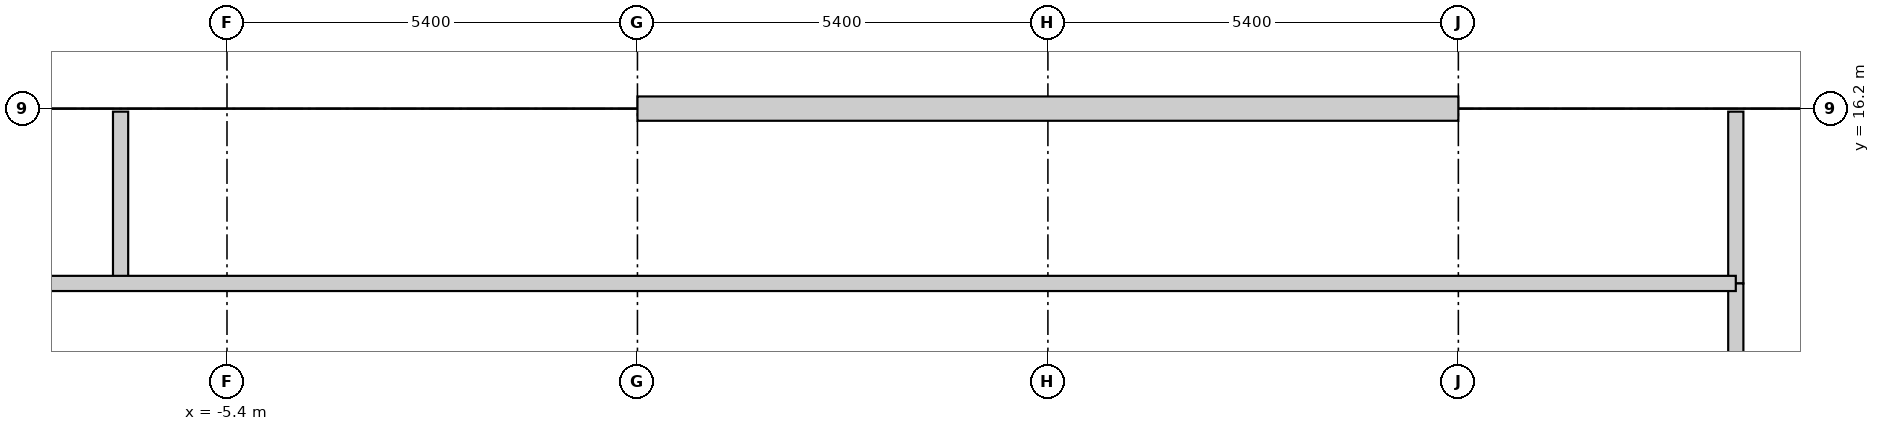
"""IFC4 building model, lengths in metres.
Left out: names, types, materials, properties, quantities, classifications, styles, units other than length and angle.
Written with IfcOpenShell. Run it as: python <this file> out.ifc"""

import sys

from ifc_helpers import new_model, si_unit, direction, frame, frame_2d, origin, place, context, subcontext, project, spatial, rectangle, extrude, element, fill, save


model = new_model("IFC4")
c1 = context("Model", 3, precision=1e-05, world=origin(), true_north=direction((0.0, 1.0)))
c2 = subcontext(c1, "Body", "Model", "MODEL_VIEW")
j1 = project(units=[si_unit("LENGTHUNIT", "METRE"), si_unit("PLANEANGLEUNIT", "RADIAN")], contexts=[c1])
p1 = place(None, origin())
s1 = spatial("IfcSite", under=j1, at=p1, CompositionType="ELEMENT")
p2 = place(p1, origin())
s2 = spatial("IfcBuilding", under=s1, at=p2, CompositionType="ELEMENT")
p3 = place(p2, origin())
s3 = spatial("IfcBuildingStorey", under=s2, at=p3, CompositionType="ELEMENT", Elevation=0.0)
p4 = place(p3, frame((0.0, 16.2, 0.0), z_axis=(0.0, 0.0, 1.0), x_axis=(1.0, 0.0, 0.0)))
e1 = element("IfcWall", 1, at=p4, inside=s3, PredefinedType="STANDARD", context=c2, shape_type="SweptSolid", body=[
    extrude(rectangle(XDim=10.8, YDim=0.32, at=frame_2d((5.4, 0.0))), origin(), (0.0, 0.0, 1.0), 3.329),
])
p5 = place(p4, frame((4.5, 0.0, 0.0)))
e2 = element("IfcOpeningElement", 2, at=p5, cuts=e1, PredefinedType="OPENING", context=c2, shape_type="SweptSolid", body=[
    extrude(rectangle(XDim=1.8, YDim=2.35, at=frame_2d((0.9, 1.175))), frame((0.0, 0.17, 0.0), z_axis=(0.0, -1.0, 0.0), x_axis=(1.0, 0.0, 0.0)), (0.0, 0.0, 1.0), 0.34),
])
for number, where, z_axis, x_axis in (
    (3, (-6.8, 13.9, 0.0), (0.0, 0.0, 1.0), (0.0, 1.0, 0.0)),
    (4, (14.45, 13.9, 0.0), (0.0, 0.0, 1.0), (0.0, 1.0, 0.0)),
):
    element("IfcWall", number, at=place(p3, frame(where, z_axis=z_axis, x_axis=x_axis)), inside=s3, PredefinedType="PARTITIONING", context=c2, shape_type="SweptSolid", body=[
        extrude(rectangle(XDim=2.26, YDim=0.2, at=frame_2d((1.13, 0.0))), origin(), (0.0, 0.0, 1.0), 4.2),
    ])
p6 = place(p3, frame((14.45, 0.0, 0.0), z_axis=(0.0, 0.0, 1.0), x_axis=(0.0, 1.0, 0.0)))
e5 = element("IfcWall", 5, at=p6, inside=s3, PredefinedType="PARTITIONING", context=c2, shape_type="SweptSolid", body=[
    extrude(rectangle(XDim=13.9, YDim=0.2, at=frame_2d((6.95, 0.0))), origin(), (0.0, 0.0, 1.0), 3.329),
])
p7 = place(p6, frame((2.5, 0.0, 0.0)))
e6 = element("IfcOpeningElement", 6, at=p7, cuts=e5, PredefinedType="OPENING", context=c2, shape_type="SweptSolid", body=[
    extrude(rectangle(XDim=1.1, YDim=2.1, at=frame_2d((0.55, 1.05))), frame((0.0, 0.11, 0.0), z_axis=(0.0, -1.0, 0.0), x_axis=(1.0, 0.0, 0.0)), (0.0, 0.0, 1.0), 0.22),
])
p8 = place(p6, frame((9.5, 0.0, 0.0)))
e7 = element("IfcOpeningElement", 7, at=p8, cuts=e5, PredefinedType="OPENING", context=c2, shape_type="SweptSolid", body=[
    extrude(rectangle(XDim=1.1, YDim=2.1, at=frame_2d((0.55, 1.05))), frame((0.0, 0.11, 0.0), z_axis=(0.0, -1.0, 0.0), x_axis=(1.0, 0.0, 0.0)), (0.0, 0.0, 1.0), 0.22),
])
p9 = place(p3, frame((-13.15, 13.9, 0.0), z_axis=(0.0, 0.0, 1.0), x_axis=(1.0, 0.0, 0.0)))
e8 = element("IfcWall", 8, at=p9, inside=s3, PredefinedType="PARTITIONING", context=c2, shape_type="SweptSolid", body=[
    extrude(rectangle(XDim=27.6, YDim=0.2, at=frame_2d((13.8, 0.0))), origin(), (0.0, 0.0, 1.0), 3.329),
])
p10 = place(p9, frame((3.2, 0.0, 0.0)))
e9 = element("IfcOpeningElement", 9, at=p10, cuts=e8, PredefinedType="OPENING", context=c2, shape_type="SweptSolid", body=[
    extrude(rectangle(XDim=0.85, YDim=2.1, at=frame_2d((0.425, 1.05))), frame((0.0, 0.11, 0.0), z_axis=(0.0, -1.0, 0.0), x_axis=(1.0, 0.0, 0.0)), (0.0, 0.0, 1.0), 0.22),
])
p11 = place(p9, frame((14.0, 0.0, 0.0)))
e10 = element("IfcOpeningElement", 10, at=p11, cuts=e8, PredefinedType="OPENING", context=c2, shape_type="SweptSolid", body=[
    extrude(rectangle(XDim=1.1, YDim=2.1, at=frame_2d((0.55, 1.05))), frame((0.0, 0.11, 0.0), z_axis=(0.0, -1.0, 0.0), x_axis=(1.0, 0.0, 0.0)), (0.0, 0.0, 1.0), 0.22),
])
p12 = place(p5, origin())
e11 = element("IfcDoor", 11, at=p12, inside=s3, OperationType="DOUBLE_DOOR_SINGLE_SWING", PredefinedType="DOOR", context=c2, shape_type="SweptSolid", body=[
    extrude(rectangle(XDim=1.8, YDim=2.35, at=frame_2d((0.9, 1.175))), frame((0.0, 0.025, 0.0), z_axis=(0.0, -1.0, 0.0), x_axis=(1.0, 0.0, 0.0)), (0.0, 0.0, 1.0), 0.05),
])
fill(e2, e11)
p13 = place(p11, origin())
e12 = element("IfcDoor", 12, at=p13, inside=s3, OperationType="SINGLE_SWING_LEFT", PredefinedType="DOOR", context=c2, shape_type="SweptSolid", body=[
    extrude(rectangle(XDim=1.1, YDim=2.1, at=frame_2d((0.55, 1.05))), frame((0.0, 0.025, 0.0), z_axis=(0.0, -1.0, 0.0), x_axis=(1.0, 0.0, 0.0)), (0.0, 0.0, 1.0), 0.05),
])
fill(e10, e12)
save(model, sys.argv[1])
